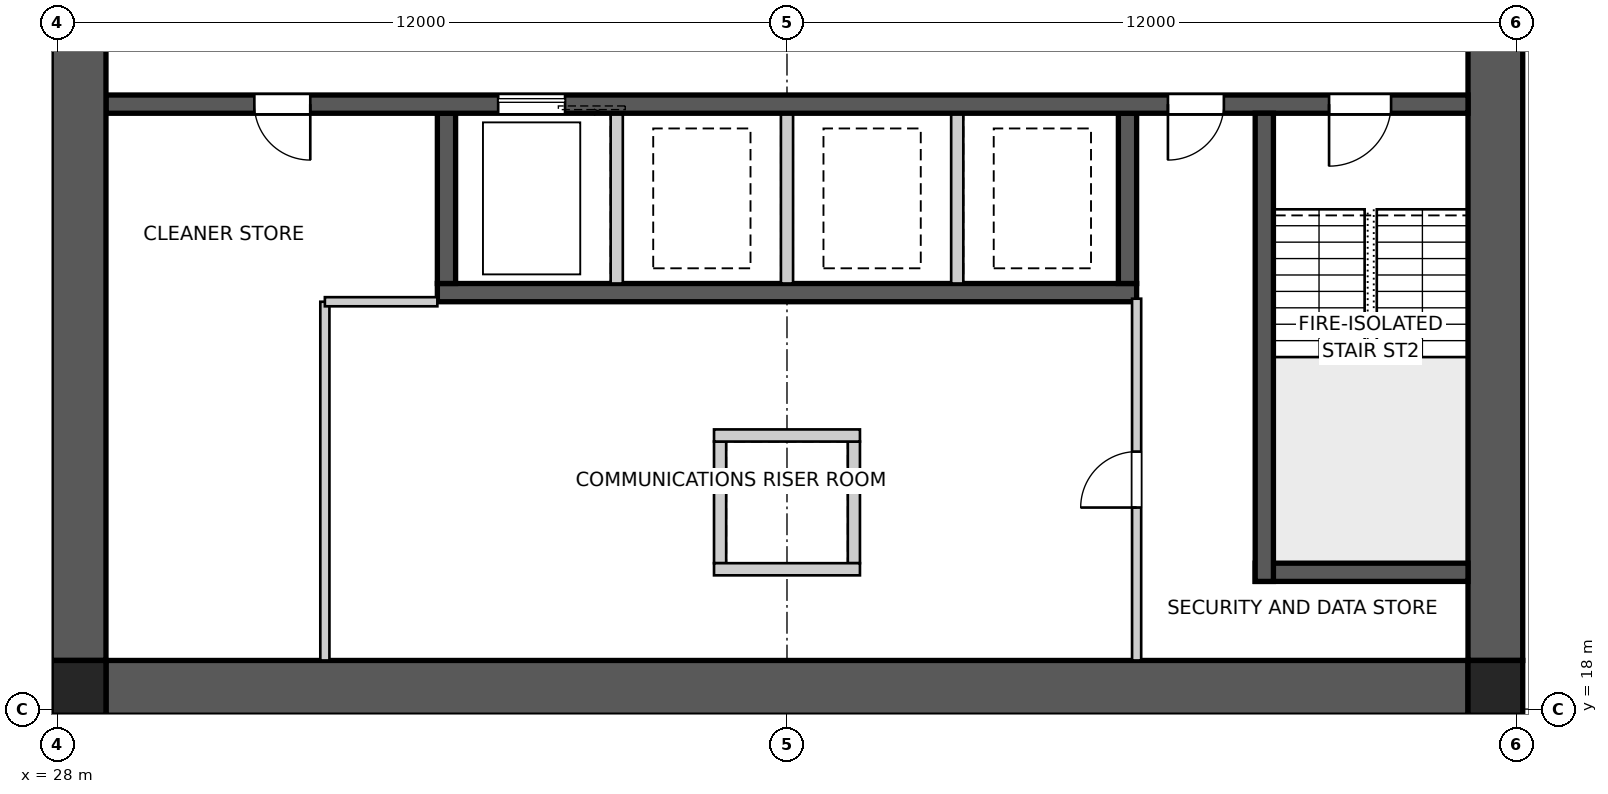
"""IFC4 building model, lengths in metres.
Left out: names, types, materials, properties, quantities, classifications, styles, units other than length and angle.
Written with IfcOpenShell. Run it as: python <this file> out.ifc"""

import sys

from ifc_helpers import new_model, si_unit, direction, frame, frame_2d, origin, origin_2d, place, context, subcontext, project, spatial, polyline, rectangle, outline, extrude, element, fill, save


model = new_model("IFC4")
c1 = context("Model", 3, precision=1e-05, world=origin(), true_north=direction((0.0, 1.0)))
c2 = subcontext(c1, "Body", "Model", "MODEL_VIEW")
j1 = project(units=[si_unit("LENGTHUNIT", "METRE"), si_unit("PLANEANGLEUNIT", "RADIAN")], contexts=[c1])
p1 = place(None, origin())
s1 = spatial("IfcSite", under=j1, at=p1, CompositionType="ELEMENT")
p2 = place(p1, origin())
s2 = spatial("IfcBuilding", under=s1, at=p2, CompositionType="ELEMENT")
p3 = place(p2, frame((0.0, 0.0, 38.8)))
s3 = spatial("IfcBuildingStorey", under=s2, at=p3, CompositionType="ELEMENT", Elevation=38.8)
p4 = place(p3, frame((51.2, 18.35, 0.0), z_axis=(0.0, 0.0, 1.0), x_axis=(-1.0, 0.0, 0.0)))
e1 = element("IfcWall", 1, at=p4, inside=s3, PredefinedType="SHEAR", context=c2, shape_type="SweptSolid", body=[
    extrude(outline(polyline([(0.0, -0.45), (22.4, -0.45), (22.4, -0.025), (22.85, -0.025), (22.85, 0.025), (22.4, 0.025), (22.4, 0.45), (0.0, 0.45), (0.0, 0.025), (-0.45, 0.025), (-0.45, -0.025), (0.0, -0.025), (0.0, -0.45)])), origin(), (0.0, 0.0, 1.0), 3.4),
])
p5 = place(p3, frame((51.65, 18.8, 0.0), z_axis=(0.0, 0.0, 1.0), x_axis=(0.0, 1.0, 0.0)))
e2 = element("IfcWall", 2, at=p5, inside=s3, PredefinedType="SHEAR", context=c2, shape_type="SweptSolid", body=[
    extrude(outline(polyline([(0.0, -0.45), (22.4, -0.45), (22.4, -0.025), (22.85, -0.025), (22.85, 0.025), (22.4, 0.025), (22.4, 0.45), (0.0, 0.45), (0.0, 0.025), (-0.45, 0.025), (-0.45, -0.025), (0.0, -0.025), (0.0, -0.45)])), origin(), (0.0, 0.0, 1.0), 3.4),
])
p6 = place(p5, frame((11.14, 0.0, 0.0)))
e3 = element("IfcOpeningElement", 3, at=p6, cuts=e2, PredefinedType="OPENING", context=c2, shape_type="SweptSolid", body=[
    extrude(rectangle(XDim=1.02, YDim=2.4, at=frame_2d((0.51, 1.2))), frame((0.0, 0.46, 0.0), z_axis=(0.0, -1.0, 0.0), x_axis=(1.0, 0.0, 0.0)), (0.0, 0.0, 1.0), 0.92),
])
p7 = place(p3, frame((28.35, 41.2, 0.0), z_axis=(0.0, 0.0, 1.0), x_axis=(0.0, -1.0, 0.0)))
e4 = element("IfcWall", 4, at=p7, inside=s3, PredefinedType="SHEAR", context=c2, shape_type="SweptSolid", body=[
    extrude(outline(polyline([(0.0, -0.45), (22.4, -0.45), (22.4, -0.025), (22.85, -0.025), (22.85, 0.025), (22.4, 0.025), (22.4, 0.45), (0.0, 0.45), (0.0, 0.025), (-0.45, 0.025), (-0.45, -0.025), (0.0, -0.025), (0.0, -0.45)])), origin(), (0.0, 0.0, 1.0), 3.4),
])
p8 = place(p7, frame((11.14, 0.0, 0.0)))
e5 = element("IfcOpeningElement", 5, at=p8, cuts=e4, PredefinedType="OPENING", context=c2, shape_type="SweptSolid", body=[
    extrude(rectangle(XDim=1.02, YDim=2.4, at=frame_2d((0.51, 1.2))), frame((0.0, 0.46, 0.0), z_axis=(0.0, -1.0, 0.0), x_axis=(1.0, 0.0, 0.0)), (0.0, 0.0, 1.0), 0.92),
])
p9 = place(p3, frame((51.2, 27.95, 0.0), z_axis=(0.0, 0.0, 1.0), x_axis=(-1.0, 0.0, 0.0)))
e6 = element("IfcWall", 6, at=p9, inside=s3, PredefinedType="SHEAR", context=c2, shape_type="SweptSolid", body=[
    extrude(rectangle(XDim=22.4, YDim=0.3, at=frame_2d((11.2, 0.0))), origin(), (0.0, 0.0, 1.0), 3.4),
])
p10 = place(p9, frame((19.04, 0.0, 0.0)))
e7 = element("IfcOpeningElement", 7, at=p10, cuts=e6, PredefinedType="OPENING", context=c2, shape_type="SweptSolid", body=[
    extrude(rectangle(XDim=0.92, YDim=2.1, at=frame_2d((0.46, 1.05))), frame((0.0, 0.16, 0.0), z_axis=(0.0, -1.0, 0.0), x_axis=(1.0, 0.0, 0.0)), (0.0, 0.0, 1.0), 0.32),
])
p11 = place(p9, frame((1.265, 0.0, 0.0)))
e8 = element("IfcOpeningElement", 8, at=p11, cuts=e6, PredefinedType="OPENING", context=c2, shape_type="SweptSolid", body=[
    extrude(rectangle(XDim=1.02, YDim=2.1, at=frame_2d((0.51, 1.05))), frame((0.0, 0.16, 0.0), z_axis=(0.0, -1.0, 0.0), x_axis=(1.0, 0.0, 0.0)), (0.0, 0.0, 1.0), 0.32),
])
p12 = place(p9, frame((4.015, 0.0, 0.0)))
e9 = element("IfcOpeningElement", 9, at=p12, cuts=e6, PredefinedType="OPENING", context=c2, shape_type="SweptSolid", body=[
    extrude(rectangle(XDim=0.92, YDim=2.1, at=frame_2d((0.46, 1.05))), frame((0.0, 0.16, 0.0), z_axis=(0.0, -1.0, 0.0), x_axis=(1.0, 0.0, 0.0)), (0.0, 0.0, 1.0), 0.32),
])
p13 = place(p9, frame((14.85, 0.0, 0.0)))
e10 = element("IfcOpeningElement", 10, at=p13, cuts=e6, PredefinedType="OPENING", context=c2, shape_type="SweptSolid", body=[
    extrude(rectangle(XDim=1.1, YDim=2.1, at=frame_2d((0.55, 1.05))), frame((0.0, 0.16, 0.0), z_axis=(0.0, -1.0, 0.0), x_axis=(1.0, 0.0, 0.0)), (0.0, 0.0, 1.0), 0.32),
])
p14 = place(p3, frame((45.75, 24.85, 0.0), z_axis=(0.0, 0.0, 1.0), x_axis=(-1.0, 0.0, 0.0)))
e11 = element("IfcWall", 11, at=p14, inside=s3, PredefinedType="SHEAR", context=c2, shape_type="SweptSolid", body=[
    extrude(rectangle(XDim=11.5, YDim=0.3, at=frame_2d((5.75, 0.0))), origin(), (0.0, 0.0, 1.0), 3.4),
])
p15 = place(p3, frame((45.6, 27.8, 0.0), z_axis=(0.0, 0.0, 1.0), x_axis=(0.0, -1.0, 0.0)))
e12 = element("IfcWall", 12, at=p15, inside=s3, PredefinedType="SHEAR", context=c2, shape_type="SweptSolid", body=[
    extrude(rectangle(XDim=2.8, YDim=0.3, at=frame_2d((1.4, 0.0))), origin(), (0.0, 0.0, 1.0), 3.4),
])
for number, where, z_axis, x_axis in (
    (13, (42.8, 27.8, 0.0), (0.0, 0.0, 1.0), (0.0, -1.0, 0.0)),
    (14, (40.0, 27.8, 0.0), (0.0, 0.0, 1.0), (0.0, -1.0, 0.0)),
    (15, (37.2, 27.8, 0.0), (0.0, 0.0, 1.0), (0.0, -1.0, 0.0)),
):
    element("IfcWall", number, at=place(p3, frame(where, z_axis=z_axis, x_axis=x_axis)), inside=s3, PredefinedType="SOLIDWALL", context=c2, shape_type="SweptSolid", body=[
        extrude(rectangle(XDim=2.8, YDim=0.2, at=frame_2d((1.4, 0.0))), origin(), (0.0, 0.0, 1.0), 3.4),
    ])
p16 = place(p3, frame((34.4, 27.8, 0.0), z_axis=(0.0, 0.0, 1.0), x_axis=(0.0, -1.0, 0.0)))
e16 = element("IfcWall", 16, at=p16, inside=s3, PredefinedType="SHEAR", context=c2, shape_type="SweptSolid", body=[
    extrude(rectangle(XDim=2.8, YDim=0.3, at=frame_2d((1.4, 0.0))), origin(), (0.0, 0.0, 1.0), 3.4),
])
p17 = place(p3, frame((47.85, 27.8, 0.0), z_axis=(0.0, 0.0, 1.0), x_axis=(0.0, -1.0, 0.0)))
e17 = element("IfcWall", 17, at=p17, inside=s3, PredefinedType="SHEAR", context=c2, shape_type="SweptSolid", body=[
    extrude(rectangle(XDim=7.7, YDim=0.3, at=frame_2d((3.85, 0.0))), origin(), (0.0, 0.0, 1.0), 3.4),
])
p18 = place(p3, frame((51.2, 20.25, 0.0), z_axis=(0.0, 0.0, 1.0), x_axis=(-1.0, 0.0, 0.0)))
e18 = element("IfcWall", 18, at=p18, inside=s3, PredefinedType="SHEAR", context=c2, shape_type="SweptSolid", body=[
    extrude(rectangle(XDim=3.5, YDim=0.3, at=frame_2d((1.75, 0.0))), origin(), (0.0, 0.0, 1.0), 3.4),
])
for number, where, z_axis, x_axis in (
    (19, (38.9, 22.4, 0.0), (0.0, 0.0, 1.0), (0.0, -1.0, 0.0)),
    (20, (41.1, 22.4, 0.0), (0.0, 0.0, 1.0), (0.0, -1.0, 0.0)),
):
    element("IfcWall", number, at=place(p3, frame(where, z_axis=z_axis, x_axis=x_axis)), inside=s3, PredefinedType="SOLIDWALL", context=c2, shape_type="SweptSolid", body=[
        extrude(rectangle(XDim=2.0, YDim=0.2, at=frame_2d((1.0, 0.0))), origin(), (0.0, 0.0, 1.0), 3.4),
    ])
for number, where, z_axis, x_axis in (
    (21, (38.8, 22.5, 0.0), (0.0, 0.0, 1.0), (1.0, 0.0, 0.0)),
    (22, (38.8, 20.3, 0.0), (0.0, 0.0, 1.0), (1.0, 0.0, 0.0)),
):
    element("IfcWall", number, at=place(p3, frame(where, z_axis=z_axis, x_axis=x_axis)), inside=s3, PredefinedType="SOLIDWALL", context=c2, shape_type="SweptSolid", body=[
        extrude(rectangle(XDim=2.4, YDim=0.2, at=frame_2d((1.2, 0.0))), origin(), (0.0, 0.0, 1.0), 3.4),
    ])
for number, where, z_axis, x_axis in (
    (23, (28.35, 18.35, 0.0), (0.0, 0.0, 1.0), (1.0, 0.0, 0.0)),
    (24, (51.65, 18.35, 0.0), (0.0, 0.0, 1.0), (1.0, 0.0, 0.0)),
):
    element("IfcColumn", number, at=place(p3, frame(where, z_axis=z_axis, x_axis=x_axis)), inside=s3, PredefinedType="COLUMN", context=c2, shape_type="SweptSolid", body=[
        extrude(rectangle(XDim=0.9, YDim=0.9, at=origin_2d()), origin(), (0.0, 0.0, 1.0), 3.4),
    ])
p19 = place(p3, frame((45.75, 18.8, 0.0), z_axis=(0.0, 0.0, 1.0), x_axis=(0.0, 1.0, 0.0)))
e25 = element("IfcWall", 25, at=p19, inside=s3, PredefinedType="SOLIDWALL", context=c2, shape_type="SweptSolid", body=[
    extrude(rectangle(XDim=5.95, YDim=0.15, at=frame_2d((2.975, 0.0))), origin(), (0.0, 0.0, 1.0), 3.2),
])
p20 = place(p19, frame((2.515, 0.0, 0.0)))
e26 = element("IfcOpeningElement", 26, at=p20, cuts=e25, PredefinedType="OPENING", context=c2, shape_type="SweptSolid", body=[
    extrude(rectangle(XDim=0.92, YDim=2.1, at=frame_2d((0.46, 1.05))), frame((0.0, 0.085, 0.0), z_axis=(0.0, -1.0, 0.0), x_axis=(1.0, 0.0, 0.0)), (0.0, 0.0, 1.0), 0.17),
])
p21 = place(p3, frame((32.4, 18.8, 0.0), z_axis=(0.0, 0.0, 1.0), x_axis=(0.0, 1.0, 0.0)))
e27 = element("IfcWall", 27, at=p21, inside=s3, PredefinedType="SOLIDWALL", context=c2, shape_type="SweptSolid", body=[
    extrude(rectangle(XDim=5.9, YDim=0.15, at=frame_2d((2.95, 0.0))), origin(), (0.0, 0.0, 1.0), 3.2),
])
p22 = place(p3, frame((32.4, 24.7, 0.0), z_axis=(0.0, 0.0, 1.0), x_axis=(1.0, 0.0, 0.0)))
e28 = element("IfcWall", 28, at=p22, inside=s3, PredefinedType="SOLIDWALL", context=c2, shape_type="SweptSolid", body=[
    extrude(rectangle(XDim=1.85, YDim=0.15, at=frame_2d((0.925, 0.0))), origin(), (0.0, 0.0, 1.0), 3.2),
])
p23 = place(p10, origin())
e29 = element("IfcDoor", 29, at=p23, inside=s3, OperationType="SINGLE_SWING_LEFT", PredefinedType="DOOR", context=c2, shape_type="SweptSolid", body=[
    extrude(rectangle(XDim=0.92, YDim=2.1, at=frame_2d((0.46, 1.05))), frame((0.0, 0.025, 0.0), z_axis=(0.0, -1.0, 0.0), x_axis=(1.0, 0.0, 0.0)), (0.0, 0.0, 1.0), 0.05),
])
fill(e7, e29)
p24 = place(p11, origin())
e30 = element("IfcDoor", 30, at=p24, inside=s3, OperationType="SINGLE_SWING_RIGHT", PredefinedType="DOOR", context=c2, shape_type="SweptSolid", body=[
    extrude(rectangle(XDim=1.02, YDim=2.1, at=frame_2d((0.51, 1.05))), frame((0.0, 0.025, 0.0), z_axis=(0.0, -1.0, 0.0), x_axis=(1.0, 0.0, 0.0)), (0.0, 0.0, 1.0), 0.05),
])
fill(e8, e30)
p25 = place(p12, origin())
e31 = element("IfcDoor", 31, at=p25, inside=s3, OperationType="SINGLE_SWING_RIGHT", PredefinedType="DOOR", context=c2, shape_type="SweptSolid", body=[
    extrude(rectangle(XDim=0.92, YDim=2.1, at=frame_2d((0.46, 1.05))), frame((0.0, 0.025, 0.0), z_axis=(0.0, -1.0, 0.0), x_axis=(1.0, 0.0, 0.0)), (0.0, 0.0, 1.0), 0.05),
])
fill(e9, e31)
p26 = place(p20, origin())
e32 = element("IfcDoor", 32, at=p26, inside=s3, OperationType="SINGLE_SWING_LEFT", PredefinedType="DOOR", context=c2, shape_type="SweptSolid", body=[
    extrude(rectangle(XDim=0.92, YDim=2.1, at=frame_2d((0.46, 1.05))), frame((0.0, 0.025, 0.0), z_axis=(0.0, -1.0, 0.0), x_axis=(1.0, 0.0, 0.0)), (0.0, 0.0, 1.0), 0.05),
])
fill(e26, e32)
p27 = place(p13, origin())
e33 = element("IfcDoor", 33, at=p27, inside=s3, OperationType="SLIDING_TO_LEFT", PredefinedType="DOOR", context=c2, shape_type="SweptSolid", body=[
    extrude(rectangle(XDim=1.1, YDim=2.1, at=frame_2d((0.55, 1.05))), frame((0.0, 0.025, 0.0), z_axis=(0.0, -1.0, 0.0), x_axis=(1.0, 0.0, 0.0)), (0.0, 0.0, 1.0), 0.05),
])
fill(e10, e33)
save(model, sys.argv[1])
